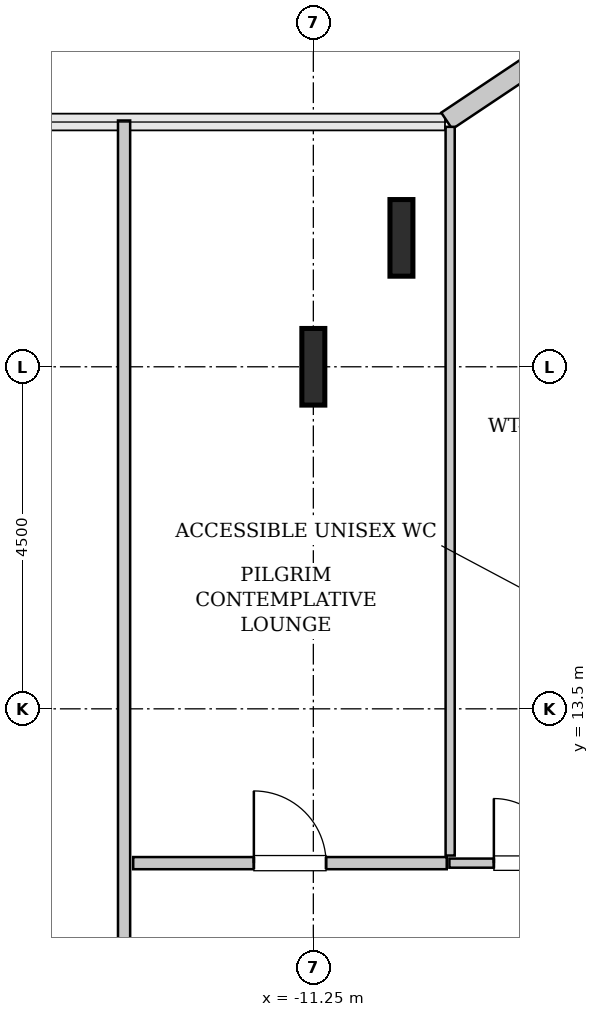
"""IFC4 building model, lengths in metres.
Left out: names, types, materials, properties, quantities, classifications, styles, units other than length and angle.
Written with IfcOpenShell. Run it as: python <this file> out.ifc"""

import sys

from ifc_helpers import new_model, si_unit, direction, frame, frame_2d, origin, origin_2d, place, context, subcontext, project, spatial, rectangle, i_section, extrude, source, transform, mapped, element, fill, save


model = new_model("IFC4")
c1 = context("Model", 3, precision=1e-05, world=origin(), true_north=direction((0.0, 1.0)))
c2 = subcontext(c1, "Body", "Model", "MODEL_VIEW")
j1 = project(units=[si_unit("LENGTHUNIT", "METRE"), si_unit("PLANEANGLEUNIT", "RADIAN")], contexts=[c1])
p1 = place(None, origin())
s1 = spatial("IfcSite", under=j1, at=p1, CompositionType="ELEMENT")
p2 = place(p1, origin())
s2 = spatial("IfcBuilding", under=s1, at=p2, CompositionType="ELEMENT")
p3 = place(p2, frame((0.0, 0.0, 52.0)))
s3 = spatial("IfcBuildingStorey", under=s2, at=p3, CompositionType="ELEMENT", Elevation=52.0)
m1 = source(origin(), c2, "Body", "SweptSolid", [
    extrude(i_section(OverallWidth=0.302, OverallDepth=1.008, WebThickness=0.021, FlangeThickness=0.04, FilletRadius=0.03, at=origin_2d()), origin(), (0.0, 0.0, 1.0), 3.8),
])
for number, where, z_axis, x_axis in (
    (1, (-11.25, 18.0, 0.0), (0.0, 0.0, 1.0), (1.0, 0.0, 0.0)),
    (2, (-10.091, 19.696, 0.0), (0.0, 0.0, 1.0), (1.0, 0.0, 0.0)),
):
    element("IfcColumn", number, at=place(p3, frame(where, z_axis=z_axis, x_axis=x_axis)), inside=s3, PredefinedType="COLUMN", context=c2, shape_type="MappedRepresentation", body=[
        mapped(m1, transform((0.0, 0.0, 0.0), x_axis=(1.0, 0.0, 0.0), y_axis=(0.0, 1.0, 0.0), z_axis=(0.0, 0.0, 1.0), scale=1.0)),
    ])
m2 = source(origin(), c2, "Body", "SweptSolid", [
    extrude(rectangle(XDim=1.469, YDim=0.26, at=frame_2d((0.734, 0.0))), origin(), (0.0, 0.0, 1.0), 3.55),
])
p4 = place(p3, frame((-8.273, 22.052, 0.0), z_axis=(0.0, 0.0, 1.0), x_axis=(-0.831461760506, -0.555581983884, 0.0)))
e3 = element("IfcWall", 3, at=p4, inside=s3, PredefinedType="SOLIDWALL", context=c2, shape_type="MappedRepresentation", body=[
    mapped(m2, transform((0.0, 0.0, 0.0), x_axis=(1.0, 0.0, 0.0), y_axis=(0.0, 1.0, 0.0), z_axis=(0.0, 0.0, 1.0), scale=1.0)),
])
m3 = source(origin(), c2, "Body", "SweptSolid", [
    extrude(rectangle(XDim=2.02, YDim=0.12, at=frame_2d((1.01, 0.0))), origin(), (0.0, 0.0, 1.0), 3.535),
])
p5 = place(p3, frame((-9.46, 11.47, 0.0), z_axis=(0.0, 0.0, 1.0), x_axis=(1.0, 0.0, 0.0)))
e4 = element("IfcWall", 4, at=p5, inside=s3, PredefinedType="PLUMBINGWALL", context=c2, shape_type="MappedRepresentation", body=[
    mapped(m3, transform((0.0, 0.0, 0.0), x_axis=(1.0, 0.0, 0.0), y_axis=(0.0, 1.0, 0.0), z_axis=(0.0, 0.0, 1.0), scale=1.0)),
])
p6 = place(p5, frame((0.585, 0.0, 0.0)))
e5 = element("IfcOpeningElement", 5, at=p6, cuts=e4, PredefinedType="OPENING", context=c2, shape_type="SweptSolid", body=[
    extrude(rectangle(XDim=0.85, YDim=2.1, at=frame_2d((0.425, 1.05))), frame((0.0, 0.07, 0.0), z_axis=(0.0, -1.0, 0.0), x_axis=(1.0, 0.0, 0.0)), (0.0, 0.0, 1.0), 0.14),
])
m4 = source(origin(), c2, "Body", "SweptSolid", [
    extrude(rectangle(XDim=9.587, YDim=0.12, at=frame_2d((4.793, 0.0))), origin(), (0.0, 0.0, 1.0), 3.535),
])
p7 = place(p3, frame((-9.45, 11.57, 0.0), z_axis=(0.0, 0.0, 1.0), x_axis=(0.0, 1.0, 0.0)))
e6 = element("IfcWall", 6, at=p7, inside=s3, PredefinedType="PLUMBINGWALL", context=c2, shape_type="MappedRepresentation", body=[
    mapped(m4, transform((0.0, 0.0, 0.0), x_axis=(1.0, 0.0, 0.0), y_axis=(0.0, 1.0, 0.0), z_axis=(0.0, 0.0, 1.0), scale=1.0)),
])
m5 = source(origin(), c2, "Body", "SweptSolid", [
    extrude(rectangle(XDim=12.845, YDim=0.16, at=frame_2d((6.422, 0.0))), origin(), (0.0, 0.0, 1.0), 3.535),
])
p8 = place(p3, frame((-13.74, 8.395, 0.0), z_axis=(0.0, 0.0, 1.0), x_axis=(0.0, 1.0, 0.0)))
e7 = element("IfcWall", 7, at=p8, inside=s3, PredefinedType="PARTITIONING", context=c2, shape_type="MappedRepresentation", body=[
    mapped(m5, transform((0.0, 0.0, 0.0), x_axis=(1.0, 0.0, 0.0), y_axis=(0.0, 1.0, 0.0), z_axis=(0.0, 0.0, 1.0), scale=1.0)),
])
p9 = place(p8, frame((1.083, 0.0, 0.0)))
e8 = element("IfcOpeningElement", 8, at=p9, cuts=e7, PredefinedType="OPENING", context=c2, shape_type="SweptSolid", body=[
    extrude(rectangle(XDim=0.95, YDim=2.1, at=frame_2d((0.475, 1.05))), frame((0.0, 0.09, 0.0), z_axis=(0.0, -1.0, 0.0), x_axis=(1.0, 0.0, 0.0)), (0.0, 0.0, 1.0), 0.18),
])
m6 = source(origin(), c2, "Body", "SweptSolid", [
    extrude(rectangle(XDim=4.125, YDim=0.16, at=frame_2d((2.062, 0.0))), origin(), (0.0, 0.0, 1.0), 3.535),
])
p10 = place(p3, frame((-13.62, 11.47, 0.0), z_axis=(0.0, 0.0, 1.0), x_axis=(1.0, 0.0, 0.0)))
e9 = element("IfcWall", 9, at=p10, inside=s3, PredefinedType="PARTITIONING", context=c2, shape_type="MappedRepresentation", body=[
    mapped(m6, transform((0.0, 0.0, 0.0), x_axis=(1.0, 0.0, 0.0), y_axis=(0.0, 1.0, 0.0), z_axis=(0.0, 0.0, 1.0), scale=1.0)),
])
p11 = place(p10, frame((1.587, 0.0, 0.0)))
e10 = element("IfcOpeningElement", 10, at=p11, cuts=e9, PredefinedType="OPENING", context=c2, shape_type="SweptSolid", body=[
    extrude(rectangle(XDim=0.95, YDim=2.1, at=frame_2d((0.475, 1.05))), frame((0.0, 0.09, 0.0), z_axis=(0.0, -1.0, 0.0), x_axis=(1.0, 0.0, 0.0)), (0.0, 0.0, 1.0), 0.18),
])
m7 = source(origin(), c2, "Body", "SweptSolid", [
    extrude(rectangle(XDim=0.85, YDim=2.1, at=frame_2d((0.425, 1.05))), frame((0.0, 0.025, 0.0), z_axis=(0.0, -1.0, 0.0), x_axis=(1.0, 0.0, 0.0)), (0.0, 0.0, 1.0), 0.05),
])
p12 = place(p6, origin())
e11 = element("IfcDoor", 11, at=p12, inside=s3, OperationType="SINGLE_SWING_LEFT", PredefinedType="DOOR", context=c2, shape_type="MappedRepresentation", body=[
    mapped(m7, transform((0.0, 0.0, 0.0), x_axis=(1.0, 0.0, 0.0), y_axis=(0.0, 1.0, 0.0), z_axis=(0.0, 0.0, 1.0), scale=1.0)),
])
fill(e5, e11)
m8 = source(origin(), c2, "Body", "SweptSolid", [
    extrude(rectangle(XDim=0.95, YDim=2.1, at=frame_2d((0.475, 1.05))), frame((0.0, 0.025, 0.0), z_axis=(0.0, -1.0, 0.0), x_axis=(1.0, 0.0, 0.0)), (0.0, 0.0, 1.0), 0.05),
])
p13 = place(p11, origin())
e12 = element("IfcDoor", 12, at=p13, inside=s3, OperationType="SINGLE_SWING_LEFT", PredefinedType="DOOR", context=c2, shape_type="MappedRepresentation", body=[
    mapped(m8, transform((0.0, 0.0, 0.0), x_axis=(1.0, 0.0, 0.0), y_axis=(0.0, 1.0, 0.0), z_axis=(0.0, 0.0, 1.0), scale=1.0)),
])
fill(e10, e12)
save(model, sys.argv[1])
